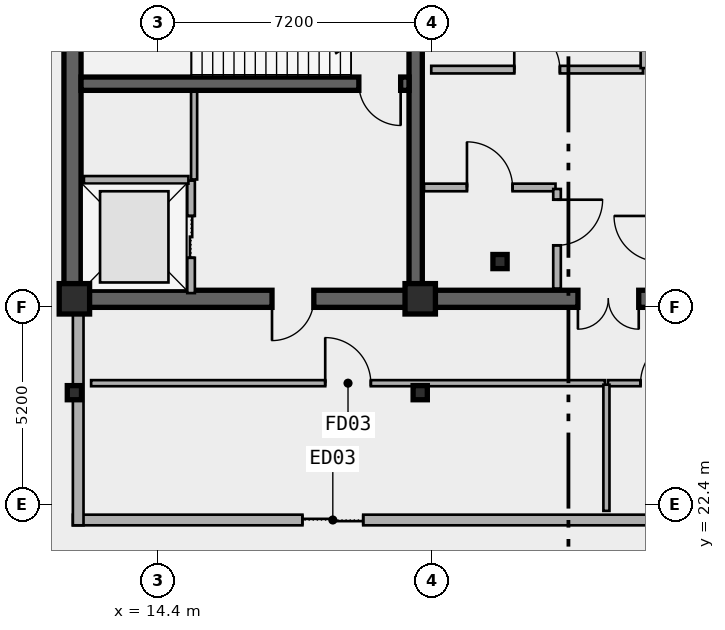
"""IFC4 building model, lengths in metres.
Left out: names, types, materials, properties, quantities, classifications, styles, units other than length and angle.
Written with IfcOpenShell. Run it as: python <this file> out.ifc"""

import sys

from ifc_helpers import new_model, si_unit, direction, frame, frame_2d, origin, origin_2d, place, context, subcontext, project, spatial, rectangle, i_section, extrude, element, fill, save


model = new_model("IFC4")
c1 = context("Model", 3, precision=1e-05, world=origin(), true_north=direction((0.0, 1.0)))
c2 = subcontext(c1, "Body", "Model", "MODEL_VIEW")
j1 = project(units=[si_unit("LENGTHUNIT", "METRE"), si_unit("PLANEANGLEUNIT", "RADIAN")], contexts=[c1])
p1 = place(None, origin())
s1 = spatial("IfcSite", under=j1, at=p1, CompositionType="ELEMENT")
p2 = place(p1, origin())
s2 = spatial("IfcBuilding", under=s1, at=p2, CompositionType="ELEMENT")
p3 = place(p2, frame((0.0, 0.0, 280.6)))
s3 = spatial("IfcBuildingStorey", under=s2, at=p3, CompositionType="ELEMENT", Elevation=280.6)
p4 = place(p3, frame((21.18, 27.82, 0.0), z_axis=(0.0, 0.0, 1.0), x_axis=(-1.0, 0.0, 0.0)))
e1 = element("IfcWall", 1, at=p4, inside=s3, PredefinedType="SHEAR", context=c2, shape_type="SweptSolid", body=[
    extrude(rectangle(XDim=9.03, YDim=0.45, at=frame_2d((4.515, 0.0))), origin(), (0.0, 0.0, 1.0), 6.0),
])
p5 = place(p4, frame((2.68, 0.0, 0.0)))
e2 = element("IfcOpeningElement", 2, at=p5, cuts=e1, PredefinedType="OPENING", context=c2, shape_type="SweptSolid", body=[
    extrude(rectangle(XDim=1.1, YDim=2.15, at=frame_2d((0.55, 1.075))), frame((0.0, 0.235, 0.0), z_axis=(0.0, -1.0, 0.0), x_axis=(1.0, 0.0, 0.0)), (0.0, 0.0, 1.0), 0.47),
])
p6 = place(p3, frame((33.15, 27.82, 0.0), z_axis=(0.0, 0.0, 1.0), x_axis=(-1.0, 0.0, 0.0)))
e3 = element("IfcWall", 3, at=p6, inside=s3, PredefinedType="SHEAR", context=c2, shape_type="SweptSolid", body=[
    extrude(rectangle(XDim=11.97, YDim=0.45, at=frame_2d((5.985, 0.0))), origin(), (0.0, 0.0, 1.0), 6.0),
])
p7 = place(p6, frame((6.1, 0.0, 0.0)))
e4 = element("IfcOpeningElement", 4, at=p7, cuts=e3, PredefinedType="OPENING", context=c2, shape_type="SweptSolid", body=[
    extrude(rectangle(XDim=1.6, YDim=2.2, at=frame_2d((0.8, 1.1))), frame((0.0, 0.235, 0.0), z_axis=(0.0, -1.0, 0.0), x_axis=(1.0, 0.0, 0.0)), (0.0, 0.0, 1.0), 0.47),
])
p8 = place(p3, frame((12.15, 28.045, 0.0), z_axis=(0.0, 0.0, 1.0), x_axis=(0.0, 1.0, 0.0)))
e5 = element("IfcWall", 5, at=p8, inside=s3, PredefinedType="SHEAR", context=c2, shape_type="SweptSolid", body=[
    extrude(rectangle(XDim=8.78, YDim=0.45, at=frame_2d((4.39, 0.0))), origin(), (0.0, 0.0, 1.0), 6.0),
])
p9 = place(p3, frame((21.18, 28.045, 0.0), z_axis=(0.0, 0.0, 1.0), x_axis=(0.0, 1.0, 0.0)))
e6 = element("IfcWall", 6, at=p9, inside=s3, PredefinedType="SHEAR", context=c2, shape_type="SweptSolid", body=[
    extrude(rectangle(XDim=8.78, YDim=0.35, at=frame_2d((4.39, 0.0))), origin(), (0.0, 0.0, 1.0), 6.0),
])
p10 = place(p3, frame((21.005, 33.48, 0.0), z_axis=(0.0, 0.0, 1.0), x_axis=(-1.0, 0.0, 0.0)))
e7 = element("IfcWall", 7, at=p10, inside=s3, PredefinedType="SHEAR", context=c2, shape_type="SweptSolid", body=[
    extrude(rectangle(XDim=8.63, YDim=0.35, at=frame_2d((4.315, 0.0))), origin(), (0.0, 0.0, 1.0), 6.0),
])
p11 = place(p10, frame((0.22, 0.0, 0.0)))
e8 = element("IfcOpeningElement", 8, at=p11, cuts=e7, PredefinedType="OPENING", context=c2, shape_type="SweptSolid", body=[
    extrude(rectangle(XDim=1.1, YDim=2.15, at=frame_2d((0.55, 1.075))), frame((0.0, 0.185, 0.0), z_axis=(0.0, -1.0, 0.0), x_axis=(1.0, 0.0, 0.0)), (0.0, 0.0, 1.0), 0.37),
])
p12 = place(p3, frame((23.4, 28.8, 0.0), z_axis=(0.0, 0.0, 1.0), x_axis=(1.0, 0.0, 0.0)))
e9 = element("IfcColumn", 9, at=p12, inside=s3, PredefinedType="COLUMN", context=c2, shape_type="SweptSolid", body=[
    extrude(i_section(OverallWidth=0.374, OverallDepth=0.372, WebThickness=0.017, FlangeThickness=0.027, FilletRadius=0.015, at=origin_2d()), origin(), (0.0, 0.0, 1.0), 6.0),
])
for number, where, z_axis, x_axis in (
    (10, (12.2, 27.82, 0.0), (0.0, 0.0, 1.0), (1.0, 0.0, 0.0)),
    (11, (21.3, 27.82, 0.0), (0.0, 0.0, 1.0), (1.0, 0.0, 0.0)),
):
    element("IfcColumn", number, at=place(p3, frame(where, z_axis=z_axis, x_axis=x_axis)), inside=s3, PredefinedType="COLUMN", context=c2, shape_type="SweptSolid", body=[
        extrude(rectangle(XDim=0.8, YDim=0.8, at=origin_2d()), origin(), (0.0, 0.0, 1.0), 6.0),
    ])
for number, where, z_axis, x_axis in (
    (12, (12.2, 25.35, 0.0), (0.0, 0.0, 1.0), (1.0, 0.0, 0.0)),
    (13, (21.3, 25.35, 0.0), (0.0, 0.0, 1.0), (1.0, 0.0, 0.0)),
):
    element("IfcColumn", number, at=place(p3, frame(where, z_axis=z_axis, x_axis=x_axis)), inside=s3, PredefinedType="COLUMN", context=c2, shape_type="SweptSolid", body=[
        extrude(i_section(OverallWidth=0.374, OverallDepth=0.372, WebThickness=0.017, FlangeThickness=0.027, FilletRadius=0.015, at=origin_2d()), origin(), (0.0, 0.0, 1.0), 6.0),
    ])
p13 = place(p3, frame((45.44, 22.0, 0.0), z_axis=(0.0, 0.0, 1.0), x_axis=(-1.0, 0.0, 0.0)))
e14 = element("IfcWall", 14, at=p13, inside=s3, PredefinedType="SOLIDWALL", context=c2, shape_type="SweptSolid", body=[
    extrude(rectangle(XDim=33.28, YDim=0.28, at=frame_2d((16.64, 0.0))), origin(), (0.0, 0.0, 1.0), 5.7),
])
p14 = place(p13, frame((25.64, 0.0, 0.0)))
e15 = element("IfcOpeningElement", 15, at=p14, cuts=e14, PredefinedType="OPENING", context=c2, shape_type="SweptSolid", body=[
    extrude(rectangle(XDim=1.6, YDim=2.2, at=frame_2d((0.8, 1.1))), frame((0.0, 0.15, 0.0), z_axis=(0.0, -1.0, 0.0), x_axis=(1.0, 0.0, 0.0)), (0.0, 0.0, 1.0), 0.3),
])
p15 = place(p3, frame((12.3, 21.86, 0.0), z_axis=(0.0, 0.0, 1.0), x_axis=(0.0, 1.0, 0.0)))
e16 = element("IfcWall", 16, at=p15, inside=s3, PredefinedType="SOLIDWALL", context=c2, shape_type="SweptSolid", body=[
    extrude(rectangle(XDim=5.69, YDim=0.28, at=frame_2d((2.845, 0.0))), origin(), (0.0, 0.0, 1.0), 5.18),
])
p16 = place(p3, frame((15.27, 27.97, 0.0), z_axis=(0.0, 0.0, 1.0), x_axis=(0.0, 1.0, 0.0)))
e17 = element("IfcWall", 17, at=p16, inside=s3, PredefinedType="PARTITIONING", context=c2, shape_type="SweptSolid", body=[
    extrude(rectangle(XDim=2.96, YDim=0.2, at=frame_2d((1.48, 0.0))), origin(), (0.0, 0.0, 1.0), 4.77),
])
p17 = place(p16, frame((0.93, 0.0, 0.0)))
e18 = element("IfcOpeningElement", 18, at=p17, cuts=e17, PredefinedType="OPENING", context=c2, shape_type="SweptSolid", body=[
    extrude(rectangle(XDim=1.1, YDim=2.15, at=frame_2d((0.55, 1.075))), frame((0.0, 0.11, 0.0), z_axis=(0.0, -1.0, 0.0), x_axis=(1.0, 0.0, 0.0)), (0.0, 0.0, 1.0), 0.22),
])
p18 = place(p3, frame((12.45, 30.95, 0.0), z_axis=(0.0, 0.0, 1.0), x_axis=(1.0, 0.0, 0.0)))
e19 = element("IfcWall", 19, at=p18, inside=s3, PredefinedType="PARTITIONING", context=c2, shape_type="SweptSolid", body=[
    extrude(rectangle(XDim=2.75, YDim=0.2, at=frame_2d((1.375, 0.0))), origin(), (0.0, 0.0, 1.0), 4.77),
])
p19 = place(p3, frame((21.4, 30.75, 0.0), z_axis=(0.0, 0.0, 1.0), x_axis=(1.0, 0.0, 0.0)))
e20 = element("IfcWall", 20, at=p19, inside=s3, PredefinedType="PARTITIONING", context=c2, shape_type="SweptSolid", body=[
    extrude(rectangle(XDim=3.46, YDim=0.2, at=frame_2d((1.73, 0.0))), origin(), (0.0, 0.0, 1.0), 4.77),
])
p20 = place(p19, frame((1.13, 0.0, 0.0)))
e21 = element("IfcOpeningElement", 21, at=p20, cuts=e20, PredefinedType="OPENING", context=c2, shape_type="SweptSolid", body=[
    extrude(rectangle(XDim=1.2, YDim=2.15, at=frame_2d((0.6, 1.075))), frame((0.0, 0.11, 0.0), z_axis=(0.0, -1.0, 0.0), x_axis=(1.0, 0.0, 0.0)), (0.0, 0.0, 1.0), 0.22),
])
p21 = place(p3, frame((21.59, 33.85, 0.0), z_axis=(0.0, 0.0, 1.0), x_axis=(1.0, 0.0, 0.0)))
e22 = element("IfcWall", 22, at=p21, inside=s3, PredefinedType="PARTITIONING", context=c2, shape_type="SweptSolid", body=[
    extrude(rectangle(XDim=5.57, YDim=0.2, at=frame_2d((2.785, 0.0))), origin(), (0.0, 0.0, 1.0), 4.77),
])
p22 = place(p21, frame((2.185, 0.0, 0.0)))
e23 = element("IfcOpeningElement", 23, at=p22, cuts=e22, PredefinedType="OPENING", context=c2, shape_type="SweptSolid", body=[
    extrude(rectangle(XDim=1.2, YDim=2.15, at=frame_2d((0.6, 1.075))), frame((0.0, 0.11, 0.0), z_axis=(0.0, -1.0, 0.0), x_axis=(1.0, 0.0, 0.0)), (0.0, 0.0, 1.0), 0.22),
])
p23 = place(p3, frame((24.9, 30.71, 0.0), z_axis=(0.0, 0.0, 1.0), x_axis=(0.0, -1.0, 0.0)))
e24 = element("IfcWall", 24, at=p23, inside=s3, PredefinedType="PARTITIONING", context=c2, shape_type="SweptSolid", body=[
    extrude(rectangle(XDim=2.62, YDim=0.2, at=frame_2d((1.31, 0.0))), origin(), (0.0, 0.0, 1.0), 5.7),
])
p24 = place(p23, frame((0.282, 0.0, 0.0)))
e25 = element("IfcOpeningElement", 25, at=p24, cuts=e24, PredefinedType="OPENING", context=c2, shape_type="SweptSolid", body=[
    extrude(rectangle(XDim=1.2, YDim=2.15, at=frame_2d((0.6, 1.075))), frame((0.0, 0.11, 0.0), z_axis=(0.0, -1.0, 0.0), x_axis=(1.0, 0.0, 0.0)), (0.0, 0.0, 1.0), 0.22),
])
p25 = place(p3, frame((27.2, 33.89, 0.0), z_axis=(0.0, 0.0, 1.0), x_axis=(0.0, 1.0, 0.0)))
e26 = element("IfcWall", 26, at=p25, inside=s3, PredefinedType="PARTITIONING", context=c2, shape_type="SweptSolid", body=[
    extrude(rectangle(XDim=2.72, YDim=0.2, at=frame_2d((1.36, 0.0))), origin(), (0.0, 0.0, 1.0), 5.7),
])
p26 = place(p3, frame((12.64, 25.6, 0.0), z_axis=(0.0, 0.0, 1.0), x_axis=(1.0, 0.0, 0.0)))
e27 = element("IfcWall", 27, at=p26, inside=s3, PredefinedType="PARTITIONING", context=c2, shape_type="SweptSolid", body=[
    extrude(rectangle(XDim=13.52, YDim=0.16, at=frame_2d((6.76, 0.0))), origin(), (0.0, 0.0, 1.0), 5.18),
])
p27 = place(p26, frame((6.16, 0.0, 0.0)))
e28 = element("IfcOpeningElement", 28, at=p27, cuts=e27, PredefinedType="OPENING", context=c2, shape_type="SweptSolid", body=[
    extrude(rectangle(XDim=1.2, YDim=2.15, at=frame_2d((0.6, 1.075))), frame((0.0, 0.09, 0.0), z_axis=(0.0, -1.0, 0.0), x_axis=(1.0, 0.0, 0.0)), (0.0, 0.0, 1.0), 0.18),
])
p28 = place(p3, frame((26.24, 25.6, 0.0), z_axis=(0.0, 0.0, 1.0), x_axis=(1.0, 0.0, 0.0)))
e29 = element("IfcWall", 29, at=p28, inside=s3, PredefinedType="PARTITIONING", context=c2, shape_type="SweptSolid", body=[
    extrude(rectangle(XDim=18.72, YDim=0.16, at=frame_2d((9.36, 0.0))), origin(), (0.0, 0.0, 1.0), 5.18),
])
p29 = place(p28, frame((0.858, 0.0, 0.0)))
e30 = element("IfcOpeningElement", 30, at=p29, cuts=e29, PredefinedType="OPENING", context=c2, shape_type="SweptSolid", body=[
    extrude(rectangle(XDim=1.2, YDim=2.15, at=frame_2d((0.6, 1.075))), frame((0.0, 0.09, 0.0), z_axis=(0.0, -1.0, 0.0), x_axis=(1.0, 0.0, 0.0)), (0.0, 0.0, 1.0), 0.18),
])
p30 = place(p3, frame((26.2, 22.24, 0.0), z_axis=(0.0, 0.0, 1.0), x_axis=(0.0, 1.0, 0.0)))
e31 = element("IfcWall", 31, at=p30, inside=s3, PredefinedType="PARTITIONING", context=c2, shape_type="SweptSolid", body=[
    extrude(rectangle(XDim=3.32, YDim=0.16, at=frame_2d((1.66, 0.0))), origin(), (0.0, 0.0, 1.0), 5.32),
])
p31 = place(p3, frame((15.35, 30.96, 0.0), z_axis=(0.0, 0.0, 1.0), x_axis=(0.0, 1.0, 0.0)))
e32 = element("IfcWall", 32, at=p31, inside=s3, PredefinedType="PARTITIONING", context=c2, shape_type="SweptSolid", body=[
    extrude(rectangle(XDim=2.31, YDim=0.16, at=frame_2d((1.155, 0.0))), origin(), (0.0, 0.0, 1.0), 5.7),
])
p32 = place(p14, origin())
e33 = element("IfcDoor", 33, at=p32, inside=s3, OperationType="DOUBLE_DOOR_SLIDING", PredefinedType="DOOR", context=c2, shape_type="SweptSolid", body=[
    extrude(rectangle(XDim=1.6, YDim=2.2, at=frame_2d((0.8, 1.1))), frame((0.0, 0.025, 0.0), z_axis=(0.0, -1.0, 0.0), x_axis=(1.0, 0.0, 0.0)), (0.0, 0.0, 1.0), 0.05),
])
fill(e15, e33)
p33 = place(p17, origin())
e34 = element("IfcDoor", 34, at=p33, inside=s3, OperationType="DOUBLE_DOOR_SLIDING", PredefinedType="DOOR", context=c2, shape_type="SweptSolid", body=[
    extrude(rectangle(XDim=1.1, YDim=2.15, at=frame_2d((0.55, 1.075))), frame((0.0, 0.025, 0.0), z_axis=(0.0, -1.0, 0.0), x_axis=(1.0, 0.0, 0.0)), (0.0, 0.0, 1.0), 0.05),
])
fill(e18, e34)
p34 = place(p11, origin())
e35 = element("IfcDoor", 35, at=p34, inside=s3, OperationType="SINGLE_SWING_LEFT", PredefinedType="DOOR", context=c2, shape_type="SweptSolid", body=[
    extrude(rectangle(XDim=1.1, YDim=2.15, at=frame_2d((0.55, 1.075))), frame((0.0, 0.025, 0.0), z_axis=(0.0, -1.0, 0.0), x_axis=(1.0, 0.0, 0.0)), (0.0, 0.0, 1.0), 0.05),
])
fill(e8, e35)
p35 = place(p5, origin())
e36 = element("IfcDoor", 36, at=p35, inside=s3, OperationType="SINGLE_SWING_RIGHT", PredefinedType="DOOR", context=c2, shape_type="SweptSolid", body=[
    extrude(rectangle(XDim=1.1, YDim=2.15, at=frame_2d((0.55, 1.075))), frame((0.0, 0.025, 0.0), z_axis=(0.0, -1.0, 0.0), x_axis=(1.0, 0.0, 0.0)), (0.0, 0.0, 1.0), 0.05),
])
fill(e2, e36)
p36 = place(p7, origin())
e37 = element("IfcDoor", 37, at=p36, inside=s3, OperationType="SINGLE_SWING_LEFT", PredefinedType="DOOR", context=c2, shape_type="SweptSolid", body=[
    extrude(rectangle(XDim=1.6, YDim=2.2, at=frame_2d((0.8, 1.1))), frame((0.0, 0.025, 0.0), z_axis=(0.0, -1.0, 0.0), x_axis=(1.0, 0.0, 0.0)), (0.0, 0.0, 1.0), 0.05),
])
fill(e4, e37)
p37 = place(p20, origin())
e38 = element("IfcDoor", 38, at=p37, inside=s3, OperationType="SINGLE_SWING_LEFT", PredefinedType="DOOR", context=c2, shape_type="SweptSolid", body=[
    extrude(rectangle(XDim=1.2, YDim=2.15, at=frame_2d((0.6, 1.075))), frame((0.0, 0.025, 0.0), z_axis=(0.0, -1.0, 0.0), x_axis=(1.0, 0.0, 0.0)), (0.0, 0.0, 1.0), 0.05),
])
fill(e21, e38)
p38 = place(p22, origin())
e39 = element("IfcDoor", 39, at=p38, inside=s3, OperationType="SINGLE_SWING_LEFT", PredefinedType="DOOR", context=c2, shape_type="SweptSolid", body=[
    extrude(rectangle(XDim=1.2, YDim=2.15, at=frame_2d((0.6, 1.075))), frame((0.0, 0.025, 0.0), z_axis=(0.0, -1.0, 0.0), x_axis=(1.0, 0.0, 0.0)), (0.0, 0.0, 1.0), 0.05),
])
fill(e23, e39)
p39 = place(p24, origin())
e40 = element("IfcDoor", 40, at=p39, inside=s3, OperationType="SINGLE_SWING_LEFT", PredefinedType="DOOR", context=c2, shape_type="SweptSolid", body=[
    extrude(rectangle(XDim=1.2, YDim=2.15, at=frame_2d((0.6, 1.075))), frame((0.0, 0.025, 0.0), z_axis=(0.0, -1.0, 0.0), x_axis=(1.0, 0.0, 0.0)), (0.0, 0.0, 1.0), 0.05),
])
fill(e25, e40)
p40 = place(p27, origin())
e41 = element("IfcDoor", 41, at=p40, inside=s3, OperationType="SINGLE_SWING_LEFT", PredefinedType="DOOR", context=c2, shape_type="SweptSolid", body=[
    extrude(rectangle(XDim=1.2, YDim=2.15, at=frame_2d((0.6, 1.075))), frame((0.0, 0.025, 0.0), z_axis=(0.0, -1.0, 0.0), x_axis=(1.0, 0.0, 0.0)), (0.0, 0.0, 1.0), 0.05),
])
fill(e28, e41)
p41 = place(p29, origin())
e42 = element("IfcDoor", 42, at=p41, inside=s3, OperationType="SINGLE_SWING_RIGHT", PredefinedType="DOOR", context=c2, shape_type="SweptSolid", body=[
    extrude(rectangle(XDim=1.2, YDim=2.15, at=frame_2d((0.6, 1.075))), frame((0.0, 0.025, 0.0), z_axis=(0.0, -1.0, 0.0), x_axis=(1.0, 0.0, 0.0)), (0.0, 0.0, 1.0), 0.05),
])
fill(e30, e42)
save(model, sys.argv[1])
